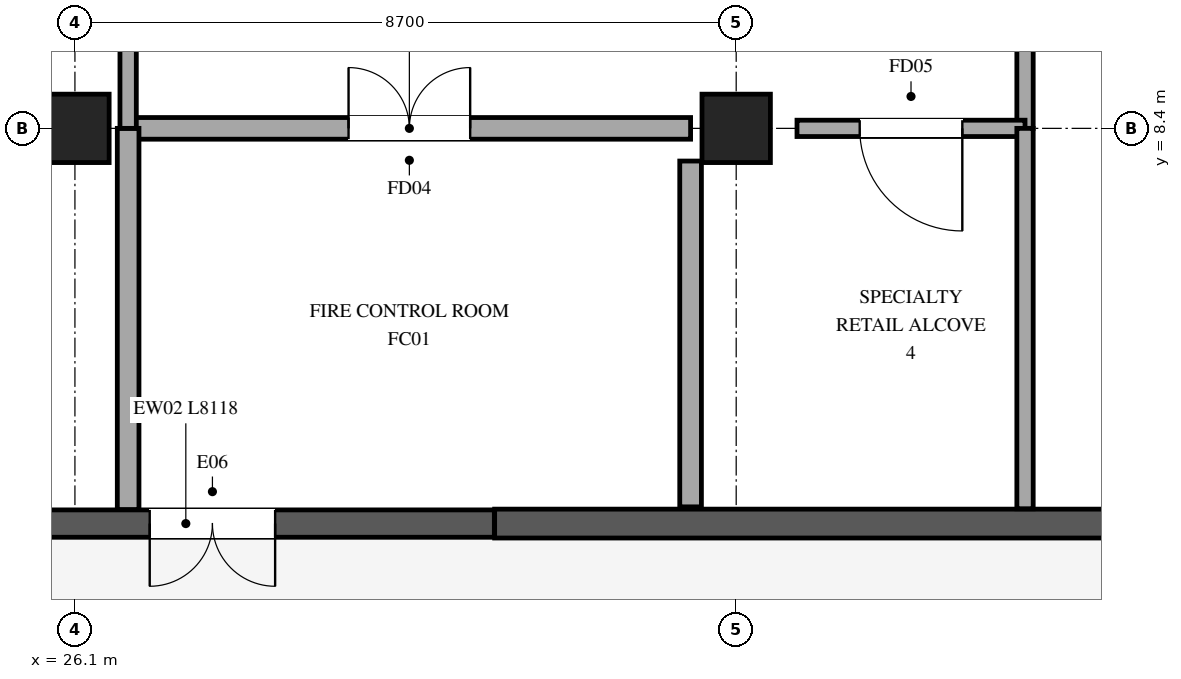
"""IFC4 building model, lengths in metres.
Left out: names, types, materials, properties, quantities, classifications, styles, units other than length and angle.
Written with IfcOpenShell. Run it as: python <this file> out.ifc"""

import sys

from ifc_helpers import new_model, si_unit, direction, frame, frame_2d, origin, origin_2d, place, context, subcontext, project, spatial, rectangle, extrude, element, fill, save


model = new_model("IFC4")
c1 = context("Model", 3, precision=1e-05, world=origin(), true_north=direction((0.0, 1.0)))
c2 = subcontext(c1, "Body", "Model", "MODEL_VIEW")
j1 = project(units=[si_unit("LENGTHUNIT", "METRE"), si_unit("PLANEANGLEUNIT", "RADIAN")], contexts=[c1])
p1 = place(None, origin())
s1 = spatial("IfcSite", under=j1, at=p1, CompositionType="ELEMENT")
p2 = place(p1, origin())
s2 = spatial("IfcBuilding", under=s1, at=p2, CompositionType="ELEMENT")
p3 = place(p2, origin())
s3 = spatial("IfcBuildingStorey", under=s2, at=p3, CompositionType="ELEMENT", Elevation=0.0)
for number, where, z_axis, x_axis in (
    (1, (26.1, 8.4, 0.0), (0.0, 0.0, 1.0), (1.0, 0.0, 0.0)),
    (2, (34.8, 8.4, 0.0), (0.0, 0.0, 1.0), (1.0, 0.0, 0.0)),
):
    element("IfcColumn", number, at=place(p3, frame(where, z_axis=z_axis, x_axis=x_axis)), inside=s3, PredefinedType="COLUMN", context=c2, shape_type="SweptSolid", body=[
        extrude(rectangle(XDim=0.9, YDim=0.9, at=origin_2d()), origin(), (0.0, 0.0, 1.0), 6.0),
    ])
p4 = place(p3, frame((39.738, 3.2, 0.0), z_axis=(0.0, 0.0, 1.0), x_axis=(-1.0, 0.0, 0.0)))
e3 = element("IfcWall", 3, at=p4, inside=s3, PredefinedType="STANDARD", context=c2, shape_type="SweptSolid", body=[
    extrude(rectangle(XDim=8.116, YDim=0.38, at=frame_2d((4.058, 0.0))), origin(), (0.0, 0.0, 1.0), 5.66),
])
p5 = place(p3, frame((31.618, 3.2, 0.0), z_axis=(0.0, 0.0, 1.0), x_axis=(-1.0, 0.0, 0.0)))
e4 = element("IfcWall", 4, at=p5, inside=s3, PredefinedType="STANDARD", context=c2, shape_type="SweptSolid", body=[
    extrude(rectangle(XDim=8.118, YDim=0.36, at=frame_2d((4.059, 0.0))), origin(), (0.0, 0.0, 1.0), 5.66),
])
p6 = place(p5, frame((2.884, 0.0, 0.0)))
e5 = element("IfcOpeningElement", 5, at=p6, cuts=e4, PredefinedType="OPENING", context=c2, shape_type="SweptSolid", body=[
    extrude(rectangle(XDim=1.65, YDim=2.2, at=frame_2d((0.825, 1.1))), frame((0.0, 0.19, 0.0), z_axis=(0.0, -1.0, 0.0), x_axis=(1.0, 0.0, 0.0)), (0.0, 0.0, 1.0), 0.38),
])
p7 = place(p3, frame((26.8, 8.4, 0.0), z_axis=(0.0, 0.0, 1.0), x_axis=(1.0, 0.0, 0.0)))
e6 = element("IfcWall", 6, at=p7, inside=s3, PredefinedType="STANDARD", context=c2, shape_type="SweptSolid", body=[
    extrude(rectangle(XDim=7.4, YDim=0.285, at=frame_2d((3.7, 0.0))), origin(), (0.0, 0.0, 1.0), 4.91),
])
p8 = place(p7, frame((2.9, 0.0, 0.0)))
e7 = element("IfcOpeningElement", 7, at=p8, cuts=e6, PredefinedType="OPENING", context=c2, shape_type="SweptSolid", body=[
    extrude(rectangle(XDim=1.6, YDim=2.25, at=frame_2d((0.8, 1.125))), frame((0.0, 0.152, 0.0), z_axis=(0.0, -1.0, 0.0), x_axis=(1.0, 0.0, 0.0)), (0.0, 0.0, 1.0), 0.305),
])
p9 = place(p3, frame((26.8, 3.385, 0.0), z_axis=(0.0, 0.0, 1.0), x_axis=(0.0, 1.0, 0.0)))
e8 = element("IfcWall", 8, at=p9, inside=s3, PredefinedType="STANDARD", context=c2, shape_type="SweptSolid", body=[
    extrude(rectangle(XDim=5.015, YDim=0.285, at=frame_2d((2.507, 0.0))), origin(), (0.0, 0.0, 1.0), 4.91),
])
p10 = place(p3, frame((26.8, 8.4, 0.0), z_axis=(0.0, 0.0, 1.0), x_axis=(0.0, 1.0, 0.0)))
e9 = element("IfcWall", 9, at=p10, inside=s3, PredefinedType="PARTITIONING", context=c2, shape_type="SweptSolid", body=[
    extrude(rectangle(XDim=3.0, YDim=0.215, at=frame_2d((1.5, 0.0))), origin(), (0.0, 0.0, 1.0), 4.91),
])
p11 = place(p3, frame((38.6, 34.98, 0.0), z_axis=(0.0, 0.0, 1.0), x_axis=(0.0, -1.0, 0.0)))
e10 = element("IfcWall", 10, at=p11, inside=s3, PredefinedType="PARTITIONING", context=c2, shape_type="SweptSolid", body=[
    extrude(rectangle(XDim=26.58, YDim=0.215, at=frame_2d((13.29, 0.0))), origin(), (0.0, 0.0, 1.0), 4.91),
])
p12 = place(p11, frame((12.615, 0.0, 0.0)))
e11 = element("IfcOpeningElement", 11, at=p12, cuts=e10, PredefinedType="OPENING", context=c2, shape_type="SweptSolid", body=[
    extrude(rectangle(XDim=1.35, YDim=2.2, at=frame_2d((0.675, 1.1))), frame((0.0, 0.118, 0.0), z_axis=(0.0, -1.0, 0.0), x_axis=(1.0, 0.0, 0.0)), (0.0, 0.0, 1.0), 0.235),
])
p13 = place(p3, frame((38.6, 8.4, 0.0), z_axis=(0.0, 0.0, 1.0), x_axis=(-1.0, 0.0, 0.0)))
e12 = element("IfcWall", 12, at=p13, inside=s3, PredefinedType="PARTITIONING", context=c2, shape_type="SweptSolid", body=[
    extrude(rectangle(XDim=3.0, YDim=0.215, at=frame_2d((1.5, 0.0))), origin(), (0.0, 0.0, 1.0), 4.91),
])
p14 = place(p13, frame((0.825, 0.0, 0.0)))
e13 = element("IfcOpeningElement", 13, at=p14, cuts=e12, PredefinedType="OPENING", context=c2, shape_type="SweptSolid", body=[
    extrude(rectangle(XDim=1.35, YDim=2.2, at=frame_2d((0.675, 1.1))), frame((0.0, 0.118, 0.0), z_axis=(0.0, -1.0, 0.0), x_axis=(1.0, 0.0, 0.0)), (0.0, 0.0, 1.0), 0.235),
])
p15 = place(p3, frame((38.6, 3.395, 0.0), z_axis=(0.0, 0.0, 1.0), x_axis=(0.0, 1.0, 0.0)))
e14 = element("IfcWall", 14, at=p15, inside=s3, PredefinedType="PARTITIONING", context=c2, shape_type="SweptSolid", body=[
    extrude(rectangle(XDim=5.005, YDim=0.215, at=frame_2d((2.502, 0.0))), origin(), (0.0, 0.0, 1.0), 4.91),
])
p16 = place(p3, frame((34.2, 7.97, 0.0), z_axis=(0.0, 0.0, 1.0), x_axis=(0.0, -1.0, 0.0)))
e15 = element("IfcWall", 15, at=p16, inside=s3, PredefinedType="STANDARD", context=c2, shape_type="SweptSolid", body=[
    extrude(rectangle(XDim=4.55, YDim=0.285, at=frame_2d((2.275, 0.0))), origin(), (0.0, 0.0, 1.0), 5.66),
])
p17 = place(p6, origin())
e16 = element("IfcDoor", 16, at=p17, inside=s3, OperationType="DOUBLE_DOOR_SINGLE_SWING", PredefinedType="DOOR", context=c2, shape_type="SweptSolid", body=[
    extrude(rectangle(XDim=1.65, YDim=2.2, at=frame_2d((0.825, 1.1))), frame((0.0, 0.025, 0.0), z_axis=(0.0, -1.0, 0.0), x_axis=(1.0, 0.0, 0.0)), (0.0, 0.0, 1.0), 0.05),
])
fill(e5, e16)
p18 = place(p8, origin())
e17 = element("IfcDoor", 17, at=p18, inside=s3, OperationType="DOUBLE_DOOR_SINGLE_SWING", PredefinedType="DOOR", context=c2, shape_type="SweptSolid", body=[
    extrude(rectangle(XDim=1.6, YDim=2.25, at=frame_2d((0.8, 1.125))), frame((0.0, 0.025, 0.0), z_axis=(0.0, -1.0, 0.0), x_axis=(1.0, 0.0, 0.0)), (0.0, 0.0, 1.0), 0.05),
])
fill(e7, e17)
p19 = place(p14, origin())
e18 = element("IfcDoor", 18, at=p19, inside=s3, OperationType="SINGLE_SWING_LEFT", PredefinedType="DOOR", context=c2, shape_type="SweptSolid", body=[
    extrude(rectangle(XDim=1.35, YDim=2.2, at=frame_2d((0.675, 1.1))), frame((0.0, 0.025, 0.0), z_axis=(0.0, -1.0, 0.0), x_axis=(1.0, 0.0, 0.0)), (0.0, 0.0, 1.0), 0.05),
])
fill(e13, e18)
save(model, sys.argv[1])
